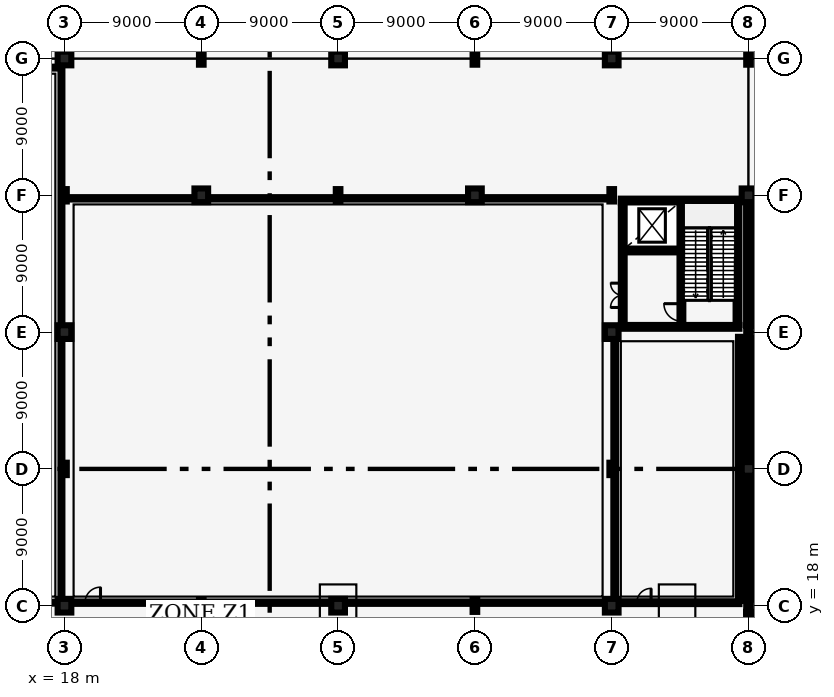
"""IFC4 building model, lengths in metres.
Left out: names, types, materials, properties, quantities, classifications, styles, units other than length and angle.
Written with IfcOpenShell. Run it as: python <this file> out.ifc"""

import sys

from ifc_helpers import new_model, si_unit, direction, frame, frame_2d, origin, origin_2d, place, context, subcontext, project, spatial, rectangle, i_section, extrude, element, fill, save


model = new_model("IFC4")
c1 = context("Model", 3, precision=1e-05, world=origin(), true_north=direction((0.0, 1.0)))
c2 = subcontext(c1, "Body", "Model", "MODEL_VIEW")
j1 = project(units=[si_unit("LENGTHUNIT", "METRE"), si_unit("PLANEANGLEUNIT", "RADIAN")], contexts=[c1])
p1 = place(None, origin())
s1 = spatial("IfcSite", under=j1, at=p1, CompositionType="ELEMENT")
p2 = place(p1, origin())
s2 = spatial("IfcBuilding", under=s1, at=p2, CompositionType="ELEMENT")
p3 = place(p2, origin())
s3 = spatial("IfcBuildingStorey", under=s2, at=p3, CompositionType="ELEMENT", Elevation=0.0)
p4 = place(p3, frame((18.0, 18.0, 0.0), z_axis=(0.0, 0.0, 1.0), x_axis=(1.0, 0.0, 0.0)))
e1 = element("IfcColumn", 1, at=p4, inside=s3, PredefinedType="COLUMN", context=c2, shape_type="SweptSolid", body=[
    extrude(rectangle(XDim=0.9, YDim=0.9, at=origin_2d()), origin(), (0.0, 0.0, 1.0), 6.0),
])
p5 = place(p3, frame((18.0, 27.0, 0.0), z_axis=(0.0, 0.0, 1.0), x_axis=(1.0, 0.0, 0.0)))
e2 = element("IfcColumn", 2, at=p5, inside=s3, PredefinedType="COLUMN", context=c2, shape_type="SweptSolid", body=[
    extrude(i_section(OverallWidth=0.303, OverallDepth=0.814, WebThickness=0.021, FlangeThickness=0.04, FilletRadius=0.03, at=origin_2d()), origin(), (0.0, 0.0, 1.0), 6.0),
])
p6 = place(p3, frame((18.0, 36.0, 0.0), z_axis=(0.0, 0.0, 1.0), x_axis=(1.0, 0.0, 0.0)))
e3 = element("IfcColumn", 3, at=p6, inside=s3, PredefinedType="COLUMN", context=c2, shape_type="SweptSolid", body=[
    extrude(rectangle(XDim=0.9, YDim=0.9, at=origin_2d()), origin(), (0.0, 0.0, 1.0), 6.0),
])
p7 = place(p3, frame((18.0, 45.0, 0.0), z_axis=(0.0, 0.0, 1.0), x_axis=(1.0, 0.0, 0.0)))
e4 = element("IfcColumn", 4, at=p7, inside=s3, PredefinedType="COLUMN", context=c2, shape_type="SweptSolid", body=[
    extrude(i_section(OverallWidth=0.303, OverallDepth=0.814, WebThickness=0.021, FlangeThickness=0.04, FilletRadius=0.03, at=origin_2d()), origin(), (0.0, 0.0, 1.0), 6.0),
])
p8 = place(p3, frame((18.0, 54.0, 0.0), z_axis=(0.0, 0.0, 1.0), x_axis=(1.0, 0.0, 0.0)))
e5 = element("IfcColumn", 5, at=p8, inside=s3, PredefinedType="COLUMN", context=c2, shape_type="SweptSolid", body=[
    extrude(rectangle(XDim=0.9, YDim=0.9, at=origin_2d()), origin(), (0.0, 0.0, 1.0), 6.0),
])
p9 = place(p3, frame((27.0, 18.0, 0.0), z_axis=(0.0, 0.0, 1.0), x_axis=(1.0, 0.0, 0.0)))
e6 = element("IfcColumn", 6, at=p9, inside=s3, PredefinedType="COLUMN", context=c2, shape_type="SweptSolid", body=[
    extrude(i_section(OverallWidth=0.303, OverallDepth=0.814, WebThickness=0.021, FlangeThickness=0.04, FilletRadius=0.03, at=origin_2d()), origin(), (0.0, 0.0, 1.0), 6.0),
])
p10 = place(p3, frame((27.0, 45.0, 0.0), z_axis=(0.0, 0.0, 1.0), x_axis=(1.0, 0.0, 0.0)))
e7 = element("IfcColumn", 7, at=p10, inside=s3, PredefinedType="COLUMN", context=c2, shape_type="SweptSolid", body=[
    extrude(rectangle(XDim=0.9, YDim=0.9, at=origin_2d()), origin(), (0.0, 0.0, 1.0), 6.0),
])
p11 = place(p3, frame((27.0, 54.0, 0.0), z_axis=(0.0, 0.0, 1.0), x_axis=(1.0, 0.0, 0.0)))
e8 = element("IfcColumn", 8, at=p11, inside=s3, PredefinedType="COLUMN", context=c2, shape_type="SweptSolid", body=[
    extrude(i_section(OverallWidth=0.303, OverallDepth=0.814, WebThickness=0.021, FlangeThickness=0.04, FilletRadius=0.03, at=origin_2d()), origin(), (0.0, 0.0, 1.0), 6.0),
])
p12 = place(p3, frame((36.0, 18.0, 0.0), z_axis=(0.0, 0.0, 1.0), x_axis=(1.0, 0.0, 0.0)))
e9 = element("IfcColumn", 9, at=p12, inside=s3, PredefinedType="COLUMN", context=c2, shape_type="SweptSolid", body=[
    extrude(rectangle(XDim=0.9, YDim=0.9, at=origin_2d()), origin(), (0.0, 0.0, 1.0), 6.0),
])
p13 = place(p3, frame((36.0, 45.0, 0.0), z_axis=(0.0, 0.0, 1.0), x_axis=(1.0, 0.0, 0.0)))
e10 = element("IfcColumn", 10, at=p13, inside=s3, PredefinedType="COLUMN", context=c2, shape_type="SweptSolid", body=[
    extrude(i_section(OverallWidth=0.303, OverallDepth=0.814, WebThickness=0.021, FlangeThickness=0.04, FilletRadius=0.03, at=origin_2d()), origin(), (0.0, 0.0, 1.0), 6.0),
])
p14 = place(p3, frame((36.0, 54.0, 0.0), z_axis=(0.0, 0.0, 1.0), x_axis=(1.0, 0.0, 0.0)))
e11 = element("IfcColumn", 11, at=p14, inside=s3, PredefinedType="COLUMN", context=c2, shape_type="SweptSolid", body=[
    extrude(rectangle(XDim=0.9, YDim=0.9, at=origin_2d()), origin(), (0.0, 0.0, 1.0), 6.0),
])
p15 = place(p3, frame((45.0, 18.0, 0.0), z_axis=(0.0, 0.0, 1.0), x_axis=(1.0, 0.0, 0.0)))
e12 = element("IfcColumn", 12, at=p15, inside=s3, PredefinedType="COLUMN", context=c2, shape_type="SweptSolid", body=[
    extrude(i_section(OverallWidth=0.303, OverallDepth=0.814, WebThickness=0.021, FlangeThickness=0.04, FilletRadius=0.03, at=origin_2d()), origin(), (0.0, 0.0, 1.0), 6.0),
])
p16 = place(p3, frame((45.0, 45.0, 0.0), z_axis=(0.0, 0.0, 1.0), x_axis=(1.0, 0.0, 0.0)))
e13 = element("IfcColumn", 13, at=p16, inside=s3, PredefinedType="COLUMN", context=c2, shape_type="SweptSolid", body=[
    extrude(rectangle(XDim=0.9, YDim=0.9, at=origin_2d()), origin(), (0.0, 0.0, 1.0), 6.0),
])
p17 = place(p3, frame((45.0, 54.0, 0.0), z_axis=(0.0, 0.0, 1.0), x_axis=(1.0, 0.0, 0.0)))
e14 = element("IfcColumn", 14, at=p17, inside=s3, PredefinedType="COLUMN", context=c2, shape_type="SweptSolid", body=[
    extrude(i_section(OverallWidth=0.303, OverallDepth=0.814, WebThickness=0.021, FlangeThickness=0.04, FilletRadius=0.03, at=origin_2d()), origin(), (0.0, 0.0, 1.0), 6.0),
])
p18 = place(p3, frame((54.0, 18.0, 0.0), z_axis=(0.0, 0.0, 1.0), x_axis=(1.0, 0.0, 0.0)))
e15 = element("IfcColumn", 15, at=p18, inside=s3, PredefinedType="COLUMN", context=c2, shape_type="SweptSolid", body=[
    extrude(rectangle(XDim=0.9, YDim=0.9, at=origin_2d()), origin(), (0.0, 0.0, 1.0), 6.0),
])
p19 = place(p3, frame((54.0, 27.0, 0.0), z_axis=(0.0, 0.0, 1.0), x_axis=(1.0, 0.0, 0.0)))
e16 = element("IfcColumn", 16, at=p19, inside=s3, PredefinedType="COLUMN", context=c2, shape_type="SweptSolid", body=[
    extrude(i_section(OverallWidth=0.303, OverallDepth=0.814, WebThickness=0.021, FlangeThickness=0.04, FilletRadius=0.03, at=origin_2d()), origin(), (0.0, 0.0, 1.0), 6.0),
])
p20 = place(p3, frame((54.0, 36.0, 0.0), z_axis=(0.0, 0.0, 1.0), x_axis=(1.0, 0.0, 0.0)))
e17 = element("IfcColumn", 17, at=p20, inside=s3, PredefinedType="COLUMN", context=c2, shape_type="SweptSolid", body=[
    extrude(rectangle(XDim=0.9, YDim=0.9, at=origin_2d()), origin(), (0.0, 0.0, 1.0), 6.0),
])
p21 = place(p3, frame((54.0, 45.0, 0.0), z_axis=(0.0, 0.0, 1.0), x_axis=(1.0, 0.0, 0.0)))
e18 = element("IfcColumn", 18, at=p21, inside=s3, PredefinedType="COLUMN", context=c2, shape_type="SweptSolid", body=[
    extrude(i_section(OverallWidth=0.303, OverallDepth=0.814, WebThickness=0.021, FlangeThickness=0.04, FilletRadius=0.03, at=origin_2d()), origin(), (0.0, 0.0, 1.0), 6.0),
])
p22 = place(p3, frame((54.0, 54.0, 0.0), z_axis=(0.0, 0.0, 1.0), x_axis=(1.0, 0.0, 0.0)))
e19 = element("IfcColumn", 19, at=p22, inside=s3, PredefinedType="COLUMN", context=c2, shape_type="SweptSolid", body=[
    extrude(rectangle(XDim=0.9, YDim=0.9, at=origin_2d()), origin(), (0.0, 0.0, 1.0), 6.0),
])
p23 = place(p3, frame((63.0, 18.0, 0.0), z_axis=(0.0, 0.0, 1.0), x_axis=(1.0, 0.0, 0.0)))
e20 = element("IfcColumn", 20, at=p23, inside=s3, PredefinedType="COLUMN", context=c2, shape_type="SweptSolid", body=[
    extrude(i_section(OverallWidth=0.303, OverallDepth=0.814, WebThickness=0.021, FlangeThickness=0.04, FilletRadius=0.03, at=origin_2d()), origin(), (0.0, 0.0, 1.0), 6.0),
])
p24 = place(p3, frame((63.0, 27.0, 0.0), z_axis=(0.0, 0.0, 1.0), x_axis=(1.0, 0.0, 0.0)))
e21 = element("IfcColumn", 21, at=p24, inside=s3, PredefinedType="COLUMN", context=c2, shape_type="SweptSolid", body=[
    extrude(rectangle(XDim=0.9, YDim=0.9, at=origin_2d()), origin(), (0.0, 0.0, 1.0), 6.0),
])
p25 = place(p3, frame((63.0, 36.0, 0.0), z_axis=(0.0, 0.0, 1.0), x_axis=(1.0, 0.0, 0.0)))
e22 = element("IfcColumn", 22, at=p25, inside=s3, PredefinedType="COLUMN", context=c2, shape_type="SweptSolid", body=[
    extrude(i_section(OverallWidth=0.303, OverallDepth=0.814, WebThickness=0.021, FlangeThickness=0.04, FilletRadius=0.03, at=origin_2d()), origin(), (0.0, 0.0, 1.0), 6.0),
])
p26 = place(p3, frame((63.0, 45.0, 0.0), z_axis=(0.0, 0.0, 1.0), x_axis=(1.0, 0.0, 0.0)))
e23 = element("IfcColumn", 23, at=p26, inside=s3, PredefinedType="COLUMN", context=c2, shape_type="SweptSolid", body=[
    extrude(rectangle(XDim=0.9, YDim=0.9, at=origin_2d()), origin(), (0.0, 0.0, 1.0), 6.0),
])
p27 = place(p3, frame((63.0, 54.0, 0.0), z_axis=(0.0, 0.0, 1.0), x_axis=(1.0, 0.0, 0.0)))
e24 = element("IfcColumn", 24, at=p27, inside=s3, PredefinedType="COLUMN", context=c2, shape_type="SweptSolid", body=[
    extrude(i_section(OverallWidth=0.303, OverallDepth=0.814, WebThickness=0.021, FlangeThickness=0.04, FilletRadius=0.03, at=origin_2d()), origin(), (0.0, 0.0, 1.0), 6.0),
])
p28 = place(p3, frame((63.0, 9.249, 0.0), z_axis=(0.0, 0.0, 1.0), x_axis=(0.0, 1.0, 0.0)))
e25 = element("IfcWall", 25, at=p28, inside=s3, PredefinedType="SOLIDWALL", context=c2, shape_type="SweptSolid", body=[
    extrude(rectangle(XDim=8.349, YDim=0.32, at=frame_2d((4.174, 0.0))), origin(), (0.0, 0.0, 1.0), 4.95),
])
p29 = place(p28, frame((2.751, 0.0, 0.85)))
e26 = element("IfcOpeningElement", 26, at=p29, cuts=e25, PredefinedType="OPENING", context=c2, shape_type="SweptSolid", body=[
    extrude(rectangle(XDim=2.4, YDim=2.1, at=frame_2d((1.2, 1.05))), frame((0.0, 0.17, 0.0), z_axis=(0.0, -1.0, 0.0), x_axis=(1.0, 0.0, 0.0)), (0.0, 0.0, 1.0), 0.34),
])
p30 = place(p3, frame((63.0, 18.402, 0.0), z_axis=(0.0, 0.0, 1.0), x_axis=(0.0, 1.0, 0.0)))
e27 = element("IfcWall", 27, at=p30, inside=s3, PredefinedType="SOLIDWALL", context=c2, shape_type="SweptSolid", body=[
    extrude(rectangle(XDim=8.153, YDim=0.32, at=frame_2d((4.076, 0.0))), origin(), (0.0, 0.0, 1.0), 4.95),
])
p31 = place(p30, frame((2.598, 0.0, 0.85)))
e28 = element("IfcOpeningElement", 28, at=p31, cuts=e27, PredefinedType="OPENING", context=c2, shape_type="SweptSolid", body=[
    extrude(rectangle(XDim=2.2, YDim=2.1, at=frame_2d((1.1, 1.05))), frame((0.0, 0.17, 0.0), z_axis=(0.0, -1.0, 0.0), x_axis=(1.0, 0.0, 0.0)), (0.0, 0.0, 1.0), 0.34),
])
p32 = place(p3, frame((63.0, 27.445, 0.0), z_axis=(0.0, 0.0, 1.0), x_axis=(0.0, 1.0, 0.0)))
e29 = element("IfcWall", 29, at=p32, inside=s3, PredefinedType="SOLIDWALL", context=c2, shape_type="SweptSolid", body=[
    extrude(rectangle(XDim=8.153, YDim=0.32, at=frame_2d((4.076, 0.0))), origin(), (0.0, 0.0, 1.0), 4.95),
])
p33 = place(p32, frame((2.555, 0.0, 0.85)))
e30 = element("IfcOpeningElement", 30, at=p33, cuts=e29, PredefinedType="OPENING", context=c2, shape_type="SweptSolid", body=[
    extrude(rectangle(XDim=2.0, YDim=2.1, at=frame_2d((1.0, 1.05))), frame((0.0, 0.17, 0.0), z_axis=(0.0, -1.0, 0.0), x_axis=(1.0, 0.0, 0.0)), (0.0, 0.0, 1.0), 0.34),
])
p34 = place(p3, frame((63.0, 36.402, 0.0), z_axis=(0.0, 0.0, 1.0), x_axis=(0.0, 1.0, 0.0)))
e31 = element("IfcWall", 31, at=p34, inside=s3, PredefinedType="SOLIDWALL", context=c2, shape_type="SweptSolid", body=[
    extrude(rectangle(XDim=8.153, YDim=0.32, at=frame_2d((4.076, 0.0))), origin(), (0.0, 0.0, 1.0), 4.95),
])
p35 = place(p3, frame((54.725, 36.47, 0.0), z_axis=(0.0, 0.0, 1.0), x_axis=(0.0, 1.0, 0.0)))
e32 = element("IfcWall", 32, at=p35, inside=s3, PredefinedType="SHEAR", context=c2, shape_type="SweptSolid", body=[
    extrude(rectangle(XDim=8.06, YDim=0.25, at=frame_2d((4.03, 0.0))), origin(), (0.0, 0.0, 1.0), 5.7),
])
p36 = place(p35, frame((1.15, 0.0, 0.0)))
e33 = element("IfcOpeningElement", 33, at=p36, cuts=e32, PredefinedType="OPENING", context=c2, shape_type="SweptSolid", body=[
    extrude(rectangle(XDim=1.6, YDim=2.2, at=frame_2d((0.8, 1.1))), frame((0.0, 0.135, 0.0), z_axis=(0.0, -1.0, 0.0), x_axis=(1.0, 0.0, 0.0)), (0.0, 0.0, 1.0), 0.27),
])
p37 = place(p3, frame((62.275, 36.47, 0.0), z_axis=(0.0, 0.0, 1.0), x_axis=(0.0, 1.0, 0.0)))
e34 = element("IfcWall", 34, at=p37, inside=s3, PredefinedType="SHEAR", context=c2, shape_type="SweptSolid", body=[
    extrude(rectangle(XDim=8.06, YDim=0.25, at=frame_2d((4.03, 0.0))), origin(), (0.0, 0.0, 1.0), 5.7),
])
for number, where, z_axis, x_axis in (
    (35, (54.6, 36.345, 0.0), (0.0, 0.0, 1.0), (1.0, 0.0, 0.0)),
    (36, (54.6, 44.655, 0.0), (0.0, 0.0, 1.0), (1.0, 0.0, 0.0)),
):
    element("IfcWall", number, at=place(p3, frame(where, z_axis=z_axis, x_axis=x_axis)), inside=s3, PredefinedType="SHEAR", context=c2, shape_type="SweptSolid", body=[
        extrude(rectangle(XDim=7.8, YDim=0.25, at=frame_2d((3.9, 0.0))), origin(), (0.0, 0.0, 1.0), 5.7),
    ])
p38 = place(p3, frame((58.585, 36.47, 0.0), z_axis=(0.0, 0.0, 1.0), x_axis=(0.0, 1.0, 0.0)))
e37 = element("IfcWall", 37, at=p38, inside=s3, PredefinedType="SHEAR", context=c2, shape_type="SweptSolid", body=[
    extrude(rectangle(XDim=8.06, YDim=0.25, at=frame_2d((4.03, 0.0))), origin(), (0.0, 0.0, 1.0), 5.7),
])
p39 = place(p38, frame((0.25, 0.0, 0.0)))
e38 = element("IfcOpeningElement", 38, at=p39, cuts=e37, PredefinedType="OPENING", context=c2, shape_type="SweptSolid", body=[
    extrude(rectangle(XDim=1.15, YDim=2.15, at=frame_2d((0.575, 1.075))), frame((0.0, 0.135, 0.0), z_axis=(0.0, -1.0, 0.0), x_axis=(1.0, 0.0, 0.0)), (0.0, 0.0, 1.0), 0.27),
])
p40 = place(p3, frame((54.85, 41.37, 0.0), z_axis=(0.0, 0.0, 1.0), x_axis=(1.0, 0.0, 0.0)))
e39 = element("IfcWall", 39, at=p40, inside=s3, PredefinedType="SHEAR", context=c2, shape_type="SweptSolid", body=[
    extrude(rectangle(XDim=3.61, YDim=0.25, at=frame_2d((1.805, 0.0))), origin(), (0.0, 0.0, 1.0), 5.7),
])
p41 = place(p40, frame((0.95, 0.0, 0.0)))
e40 = element("IfcOpeningElement", 40, at=p41, cuts=e39, PredefinedType="OPENING", context=c2, shape_type="SweptSolid", body=[
    extrude(rectangle(XDim=1.2, YDim=2.2, at=frame_2d((0.6, 1.1))), frame((0.0, 0.135, 0.0), z_axis=(0.0, -1.0, 0.0), x_axis=(1.0, 0.0, 0.0)), (0.0, 0.0, 1.0), 0.27),
])
p42 = place(p3, frame((18.2, 18.2, 0.0), z_axis=(0.0, 0.0, 1.0), x_axis=(1.0, 0.0, 0.0)))
e41 = element("IfcWall", 41, at=p42, inside=s3, PredefinedType="PARTITIONING", context=c2, shape_type="SweptSolid", body=[
    extrude(rectangle(XDim=35.6, YDim=0.155, at=frame_2d((17.8, 0.0))), origin(), (0.0, 0.0, 1.0), 4.85),
])
p43 = place(p42, frame((1.15, 0.0, 0.0)))
e42 = element("IfcOpeningElement", 42, at=p43, cuts=e41, PredefinedType="OPENING", context=c2, shape_type="SweptSolid", body=[
    extrude(rectangle(XDim=1.02, YDim=2.15, at=frame_2d((0.51, 1.075))), frame((0.0, 0.087, 0.0), z_axis=(0.0, -1.0, 0.0), x_axis=(1.0, 0.0, 0.0)), (0.0, 0.0, 1.0), 0.175),
])
p44 = place(p3, frame((18.293, 44.8, 0.0), z_axis=(0.0, 0.0, 1.0), x_axis=(1.0, 0.0, 0.0)))
e43 = element("IfcWall", 43, at=p44, inside=s3, PredefinedType="PARTITIONING", context=c2, shape_type="SweptSolid", body=[
    extrude(rectangle(XDim=35.414, YDim=0.155, at=frame_2d((17.707, 0.0))), origin(), (0.0, 0.0, 1.0), 4.85),
])
p45 = place(p3, frame((9.0, 18.2, 0.0), z_axis=(0.0, 0.0, 1.0), x_axis=(1.0, 0.0, 0.0)))
e44 = element("IfcWall", 44, at=p45, inside=s3, PredefinedType="PARTITIONING", context=c2, shape_type="SweptSolid", body=[
    extrude(rectangle(XDim=8.8, YDim=0.125, at=frame_2d((4.4, 0.0))), origin(), (0.0, 0.0, 1.0), 4.85),
])
p46 = place(p45, frame((1.45, 0.0, 0.0)))
e45 = element("IfcOpeningElement", 45, at=p46, cuts=e44, PredefinedType="OPENING", context=c2, shape_type="SweptSolid", body=[
    extrude(rectangle(XDim=0.98, YDim=2.12, at=frame_2d((0.49, 1.06))), frame((0.0, 0.073, 0.0), z_axis=(0.0, -1.0, 0.0), x_axis=(1.0, 0.0, 0.0)), (0.0, 0.0, 1.0), 0.145),
])
p47 = place(p3, frame((9.075, 53.4, 0.0), z_axis=(0.0, 0.0, 1.0), x_axis=(1.0, 0.0, 0.0)))
e46 = element("IfcWall", 46, at=p47, inside=s3, PredefinedType="PARTITIONING", context=c2, shape_type="SweptSolid", body=[
    extrude(rectangle(XDim=8.65, YDim=0.125, at=frame_2d((4.325, 0.0))), origin(), (0.0, 0.0, 1.0), 4.85),
])
p48 = place(p3, frame((17.8, 18.275, 0.0), z_axis=(0.0, 0.0, 1.0), x_axis=(0.0, 1.0, 0.0)))
e47 = element("IfcWall", 47, at=p48, inside=s3, PredefinedType="PARTITIONING", context=c2, shape_type="SweptSolid", body=[
    extrude(rectangle(XDim=35.05, YDim=0.125, at=frame_2d((17.525, 0.0))), origin(), (0.0, 0.0, 1.0), 4.85),
])
p49 = place(p3, frame((54.2, 18.2, 0.0), z_axis=(0.0, 0.0, 1.0), x_axis=(1.0, 0.0, 0.0)))
e48 = element("IfcWall", 48, at=p49, inside=s3, PredefinedType="PARTITIONING", context=c2, shape_type="SweptSolid", body=[
    extrude(rectangle(XDim=8.2, YDim=0.185, at=frame_2d((4.1, 0.0))), origin(), (0.0, 0.0, 1.0), 4.85),
])
p50 = place(p49, frame((1.45, 0.0, 0.0)))
e49 = element("IfcOpeningElement", 49, at=p50, cuts=e48, PredefinedType="OPENING", context=c2, shape_type="SweptSolid", body=[
    extrude(rectangle(XDim=0.94, YDim=2.1, at=frame_2d((0.47, 1.05))), frame((0.0, 0.103, 0.0), z_axis=(0.0, -1.0, 0.0), x_axis=(1.0, 0.0, 0.0)), (0.0, 0.0, 1.0), 0.205),
])
for number, where, z_axis, x_axis in (
    (50, (54.2, 18.311, 0.0), (0.0, 0.0, 1.0), (0.0, 1.0, 0.0)),
    (51, (62.4, 18.311, 0.0), (0.0, 0.0, 1.0), (0.0, 1.0, 0.0)),
):
    element("IfcWall", number, at=place(p3, frame(where, z_axis=z_axis, x_axis=x_axis)), inside=s3, PredefinedType="PARTITIONING", context=c2, shape_type="SweptSolid", body=[
        extrude(rectangle(XDim=17.378, YDim=0.185, at=frame_2d((8.689, 0.0))), origin(), (0.0, 0.0, 1.0), 4.85),
    ])
p51 = place(p31, origin())
e52 = element("IfcWindow", 52, at=p51, inside=s3, PartitioningType="SINGLE_PANEL", PredefinedType="WINDOW", context=c2, shape_type="SweptSolid", body=[
    extrude(rectangle(XDim=2.2, YDim=2.1, at=frame_2d((1.1, 1.05))), frame((0.0, 0.03, 0.0), z_axis=(0.0, -1.0, 0.0), x_axis=(1.0, 0.0, 0.0)), (0.0, 0.0, 1.0), 0.06),
])
fill(e28, e52)
p52 = place(p33, origin())
e53 = element("IfcWindow", 53, at=p52, inside=s3, PartitioningType="SINGLE_PANEL", PredefinedType="WINDOW", context=c2, shape_type="SweptSolid", body=[
    extrude(rectangle(XDim=2.0, YDim=2.1, at=frame_2d((1.0, 1.05))), frame((0.0, 0.03, 0.0), z_axis=(0.0, -1.0, 0.0), x_axis=(1.0, 0.0, 0.0)), (0.0, 0.0, 1.0), 0.06),
])
fill(e30, e53)
p53 = place(p39, origin())
e54 = element("IfcDoor", 54, at=p53, inside=s3, OperationType="SINGLE_SWING_RIGHT", PredefinedType="DOOR", context=c2, shape_type="SweptSolid", body=[
    extrude(rectangle(XDim=1.15, YDim=2.15, at=frame_2d((0.575, 1.075))), frame((0.0, 0.025, 0.0), z_axis=(0.0, -1.0, 0.0), x_axis=(1.0, 0.0, 0.0)), (0.0, 0.0, 1.0), 0.05),
])
fill(e38, e54)
p54 = place(p41, origin())
e55 = element("IfcDoor", 55, at=p54, inside=s3, OperationType="DOUBLE_DOOR_SLIDING", PredefinedType="DOOR", context=c2, shape_type="SweptSolid", body=[
    extrude(rectangle(XDim=1.2, YDim=2.2, at=frame_2d((0.6, 1.1))), frame((0.0, 0.025, 0.0), z_axis=(0.0, -1.0, 0.0), x_axis=(1.0, 0.0, 0.0)), (0.0, 0.0, 1.0), 0.05),
])
fill(e40, e55)
p55 = place(p36, origin())
e56 = element("IfcDoor", 56, at=p55, inside=s3, OperationType="DOUBLE_DOOR_SINGLE_SWING", PredefinedType="DOOR", context=c2, shape_type="SweptSolid", body=[
    extrude(rectangle(XDim=1.6, YDim=2.2, at=frame_2d((0.8, 1.1))), frame((0.0, 0.025, 0.0), z_axis=(0.0, -1.0, 0.0), x_axis=(1.0, 0.0, 0.0)), (0.0, 0.0, 1.0), 0.05),
])
fill(e33, e56)
p56 = place(p43, origin())
e57 = element("IfcDoor", 57, at=p56, inside=s3, OperationType="SINGLE_SWING_RIGHT", PredefinedType="DOOR", context=c2, shape_type="SweptSolid", body=[
    extrude(rectangle(XDim=1.02, YDim=2.15, at=frame_2d((0.51, 1.075))), frame((0.0, 0.025, 0.0), z_axis=(0.0, -1.0, 0.0), x_axis=(1.0, 0.0, 0.0)), (0.0, 0.0, 1.0), 0.05),
])
fill(e42, e57)
p57 = place(p50, origin())
e58 = element("IfcDoor", 58, at=p57, inside=s3, OperationType="SINGLE_SWING_RIGHT", PredefinedType="DOOR", context=c2, shape_type="SweptSolid", body=[
    extrude(rectangle(XDim=0.94, YDim=2.1, at=frame_2d((0.47, 1.05))), frame((0.0, 0.025, 0.0), z_axis=(0.0, -1.0, 0.0), x_axis=(1.0, 0.0, 0.0)), (0.0, 0.0, 1.0), 0.05),
])
fill(e49, e58)
save(model, sys.argv[1])
